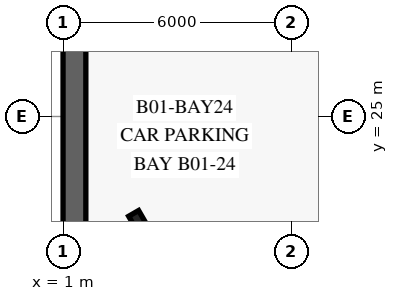
"""IFC4 building model, lengths in metres.
Left out: names, types, materials, properties, quantities, classifications, styles, units other than length and angle.
Written with IfcOpenShell. Run it as: python <this file> out.ifc"""

import sys

from ifc_helpers import new_model, si_unit, direction, frame, frame_2d, origin, origin_2d, place, context, subcontext, project, spatial, rectangle, i_section, extrude, element, save


model = new_model("IFC4")
c1 = context("Model", 3, precision=1e-05, world=origin(), true_north=direction((0.0, 1.0)))
c2 = subcontext(c1, "Body", "Model", "MODEL_VIEW")
j1 = project(units=[si_unit("LENGTHUNIT", "METRE"), si_unit("PLANEANGLEUNIT", "RADIAN")], contexts=[c1])
p1 = place(None, origin())
s1 = spatial("IfcSite", under=j1, at=p1, CompositionType="ELEMENT")
p2 = place(p1, origin())
s2 = spatial("IfcBuilding", under=s1, at=p2, CompositionType="ELEMENT")
p3 = place(p2, frame((0.0, 0.0, -4.2)))
s3 = spatial("IfcBuildingStorey", under=s2, at=p3, CompositionType="ELEMENT", Elevation=-4.2)
p4 = place(p3, frame((1.3, 48.4, 0.0), z_axis=(0.0, 0.0, 1.0), x_axis=(0.0, -1.0, 0.0)))
e1 = element("IfcWall", 1, at=p4, inside=s3, PredefinedType="USERDEFINED", context=c2, shape_type="SweptSolid", body=[
    extrude(rectangle(XDim=46.8, YDim=0.6, at=frame_2d((23.4, 0.0))), origin(), (0.0, 0.0, 1.0), 3.88),
])
p5 = place(p3, frame((3.11, 22.014, 0.0), z_axis=(0.0, 0.0, 1.0), x_axis=(-0.5, 0.866025403784, 0.0)))
e2 = element("IfcColumn", 2, at=p5, inside=s3, PredefinedType="COLUMN", context=c2, shape_type="SweptSolid", body=[
    extrude(i_section(OverallWidth=0.302, OverallDepth=1.008, WebThickness=0.021, FlangeThickness=0.04, at=origin_2d()), origin(), (0.0, 0.0, 1.0), 4.2),
])
save(model, sys.argv[1])
